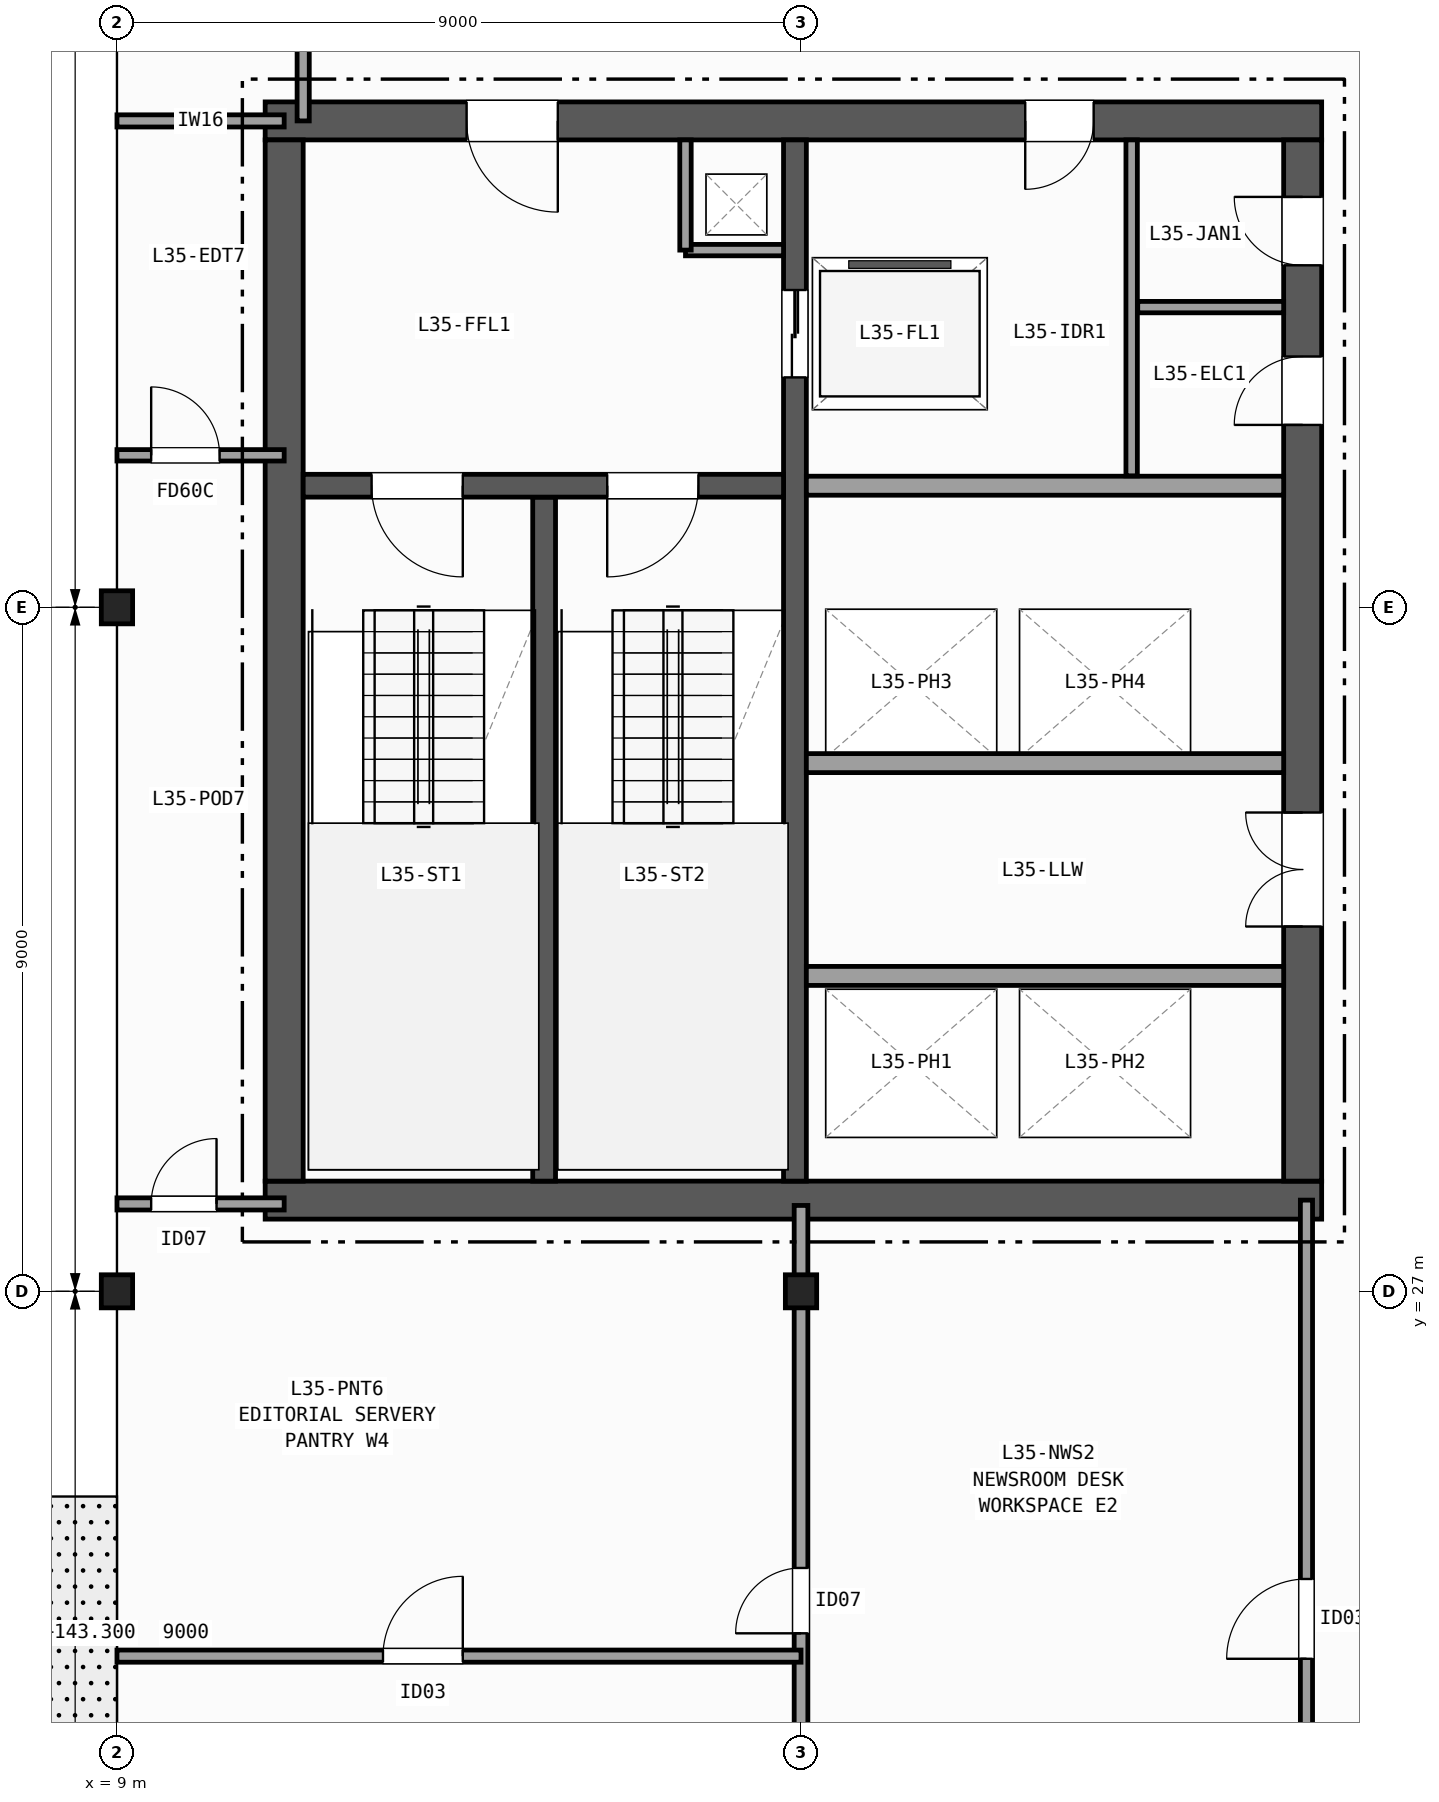
"""IFC4 building model, lengths in metres.
Left out: names, types, materials, properties, quantities, classifications, styles, units other than length and angle.
Written with IfcOpenShell. Run it as: python <this file> out.ifc"""

import sys

from ifc_helpers import new_model, si_unit, direction, frame, frame_2d, origin, origin_2d, place, context, subcontext, project, spatial, rectangle, i_section, extrude, element, fill, save


model = new_model("IFC4")
c1 = context("Model", 3, precision=1e-05, world=origin(), true_north=direction((0.0, 1.0)))
c2 = subcontext(c1, "Body", "Model", "MODEL_VIEW")
j1 = project(units=[si_unit("LENGTHUNIT", "METRE"), si_unit("PLANEANGLEUNIT", "RADIAN")], contexts=[c1])
p1 = place(None, origin())
s1 = spatial("IfcSite", under=j1, at=p1, CompositionType="ELEMENT")
p2 = place(p1, origin())
s2 = spatial("IfcBuilding", under=s1, at=p2, CompositionType="ELEMENT")
p3 = place(p2, frame((0.0, 0.0, 143.3)))
s3 = spatial("IfcBuildingStorey", under=s2, at=p3, CompositionType="ELEMENT", Elevation=143.3)
for number, where, z_axis, x_axis in (
    (1, (9.0, 27.0, 0.0), (0.0, 0.0, 1.0), (1.0, 0.0, 0.0)),
    (2, (9.0, 36.0, 0.0), (0.0, 0.0, 1.0), (1.0, 0.0, 0.0)),
    (3, (18.0, 27.0, 0.0), (0.0, 0.0, 1.0), (1.0, 0.0, 0.0)),
):
    element("IfcColumn", number, at=place(p3, frame(where, z_axis=z_axis, x_axis=x_axis)), inside=s3, PredefinedType="COLUMN", context=c2, shape_type="SweptSolid", body=[
        extrude(i_section(OverallWidth=0.412, OverallDepth=0.435, WebThickness=0.036, FlangeThickness=0.057, FilletRadius=0.015, at=origin_2d()), origin(), (0.0, 0.0, 1.0), 3.7),
    ])
p4 = place(p3, frame((10.95, 28.2, 0.0), z_axis=(0.0, 0.0, 1.0), x_axis=(1.0, 0.0, 0.0)))
e4 = element("IfcWall", 4, at=p4, inside=s3, PredefinedType="SHEAR", context=c2, shape_type="SweptSolid", body=[
    extrude(rectangle(XDim=13.9, YDim=0.5, at=frame_2d((6.95, 0.0))), origin(), (0.0, 0.0, 1.0), 3.42),
])
p5 = place(p3, frame((24.85, 42.4, 0.0), z_axis=(0.0, 0.0, 1.0), x_axis=(-1.0, 0.0, 0.0)))
e5 = element("IfcWall", 5, at=p5, inside=s3, PredefinedType="SHEAR", context=c2, shape_type="SweptSolid", body=[
    extrude(rectangle(XDim=13.9, YDim=0.5, at=frame_2d((6.95, 0.0))), origin(), (0.0, 0.0, 1.0), 3.42),
])
p6 = place(p5, frame((10.05, 0.0, 0.0)))
e6 = element("IfcOpeningElement", 6, at=p6, cuts=e5, PredefinedType="OPENING", context=c2, shape_type="SweptSolid", body=[
    extrude(rectangle(XDim=1.2, YDim=2.15, at=frame_2d((0.6, 1.075))), frame((0.0, 0.26, 0.0), z_axis=(0.0, -1.0, 0.0), x_axis=(1.0, 0.0, 0.0)), (0.0, 0.0, 1.0), 0.52),
])
p7 = place(p5, frame((3.0, 0.0, 0.0)))
e7 = element("IfcOpeningElement", 7, at=p7, cuts=e5, PredefinedType="OPENING", context=c2, shape_type="SweptSolid", body=[
    extrude(rectangle(XDim=0.9, YDim=2.1, at=frame_2d((0.45, 1.05))), frame((0.0, 0.26, 0.0), z_axis=(0.0, -1.0, 0.0), x_axis=(1.0, 0.0, 0.0)), (0.0, 0.0, 1.0), 0.52),
])
p8 = place(p3, frame((11.2, 42.15, 0.0), z_axis=(0.0, 0.0, 1.0), x_axis=(0.0, -1.0, 0.0)))
e8 = element("IfcWall", 8, at=p8, inside=s3, PredefinedType="SHEAR", context=c2, shape_type="SweptSolid", body=[
    extrude(rectangle(XDim=13.7, YDim=0.5, at=frame_2d((6.85, 0.0))), origin(), (0.0, 0.0, 1.0), 3.42),
])
p9 = place(p3, frame((24.6, 28.45, 0.0), z_axis=(0.0, 0.0, 1.0), x_axis=(0.0, 1.0, 0.0)))
e9 = element("IfcWall", 9, at=p9, inside=s3, PredefinedType="SHEAR", context=c2, shape_type="SweptSolid", body=[
    extrude(rectangle(XDim=13.7, YDim=0.5, at=frame_2d((6.85, 0.0))), origin(), (0.0, 0.0, 1.0), 3.42),
])
p10 = place(p9, frame((3.35, 0.0, 0.0)))
e10 = element("IfcOpeningElement", 10, at=p10, cuts=e9, PredefinedType="OPENING", context=c2, shape_type="SweptSolid", body=[
    extrude(rectangle(XDim=1.5, YDim=2.2, at=frame_2d((0.75, 1.1))), frame((0.0, 0.26, 0.0), z_axis=(0.0, -1.0, 0.0), x_axis=(1.0, 0.0, 0.0)), (0.0, 0.0, 1.0), 0.52),
])
p11 = place(p9, frame((9.95, 0.0, 0.0)))
e11 = element("IfcOpeningElement", 11, at=p11, cuts=e9, PredefinedType="OPENING", context=c2, shape_type="SweptSolid", body=[
    extrude(rectangle(XDim=0.9, YDim=2.1, at=frame_2d((0.45, 1.05))), frame((0.0, 0.26, 0.0), z_axis=(0.0, -1.0, 0.0), x_axis=(1.0, 0.0, 0.0)), (0.0, 0.0, 1.0), 0.52),
])
p12 = place(p9, frame((12.05, 0.0, 0.0)))
e12 = element("IfcOpeningElement", 12, at=p12, cuts=e9, PredefinedType="OPENING", context=c2, shape_type="SweptSolid", body=[
    extrude(rectangle(XDim=0.9, YDim=2.1, at=frame_2d((0.45, 1.05))), frame((0.0, 0.26, 0.0), z_axis=(0.0, -1.0, 0.0), x_axis=(1.0, 0.0, 0.0)), (0.0, 0.0, 1.0), 0.52),
])
p13 = place(p3, frame((14.62, 28.45, 0.0), z_axis=(0.0, 0.0, 1.0), x_axis=(0.0, 1.0, 0.0)))
e13 = element("IfcWall", 13, at=p13, inside=s3, PredefinedType="SHEAR", context=c2, shape_type="SweptSolid", body=[
    extrude(rectangle(XDim=9.0, YDim=0.3, at=frame_2d((4.5, 0.0))), origin(), (0.0, 0.0, 1.0), 3.42),
])
p14 = place(p3, frame((17.92, 42.15, 0.0), z_axis=(0.0, 0.0, 1.0), x_axis=(0.0, -1.0, 0.0)))
e14 = element("IfcWall", 14, at=p14, inside=s3, PredefinedType="SHEAR", context=c2, shape_type="SweptSolid", body=[
    extrude(rectangle(XDim=13.7, YDim=0.3, at=frame_2d((6.85, 0.0))), origin(), (0.0, 0.0, 1.0), 3.42),
])
p15 = place(p14, frame((1.975, 0.0, 0.0)))
e15 = element("IfcOpeningElement", 15, at=p15, cuts=e14, PredefinedType="OPENING", context=c2, shape_type="SweptSolid", body=[
    extrude(rectangle(XDim=1.15, YDim=2.15, at=frame_2d((0.575, 1.075))), frame((0.0, 0.16, 0.0), z_axis=(0.0, -1.0, 0.0), x_axis=(1.0, 0.0, 0.0)), (0.0, 0.0, 1.0), 0.32),
])
p16 = place(p3, frame((17.77, 37.6, 0.0), z_axis=(0.0, 0.0, 1.0), x_axis=(-1.0, 0.0, 0.0)))
e16 = element("IfcWall", 16, at=p16, inside=s3, PredefinedType="SHEAR", context=c2, shape_type="SweptSolid", body=[
    extrude(rectangle(XDim=6.32, YDim=0.3, at=frame_2d((3.16, 0.0))), origin(), (0.0, 0.0, 1.0), 3.42),
])
p17 = place(p16, frame((4.22, 0.0, 0.0)))
e17 = element("IfcOpeningElement", 17, at=p17, cuts=e16, PredefinedType="OPENING", context=c2, shape_type="SweptSolid", body=[
    extrude(rectangle(XDim=1.2, YDim=2.15, at=frame_2d((0.6, 1.075))), frame((0.0, 0.16, 0.0), z_axis=(0.0, -1.0, 0.0), x_axis=(1.0, 0.0, 0.0)), (0.0, 0.0, 1.0), 0.32),
])
p18 = place(p16, frame((1.12, 0.0, 0.0)))
e18 = element("IfcOpeningElement", 18, at=p18, cuts=e16, PredefinedType="OPENING", context=c2, shape_type="SweptSolid", body=[
    extrude(rectangle(XDim=1.2, YDim=2.15, at=frame_2d((0.6, 1.075))), frame((0.0, 0.16, 0.0), z_axis=(0.0, -1.0, 0.0), x_axis=(1.0, 0.0, 0.0)), (0.0, 0.0, 1.0), 0.32),
])
p19 = place(p3, frame((16.48, 40.7, 0.0), z_axis=(0.0, 0.0, 1.0), x_axis=(1.0, 0.0, 0.0)))
e19 = element("IfcWall", 19, at=p19, inside=s3, PredefinedType="PARTITIONING", context=c2, shape_type="SweptSolid", body=[
    extrude(rectangle(XDim=1.29, YDim=0.15, at=frame_2d((0.645, 0.0))), origin(), (0.0, 0.0, 1.0), 3.42),
])
p20 = place(p3, frame((16.48, 40.7, 0.0), z_axis=(0.0, 0.0, 1.0), x_axis=(0.0, 1.0, 0.0)))
e20 = element("IfcWall", 20, at=p20, inside=s3, PredefinedType="PARTITIONING", context=c2, shape_type="SweptSolid", body=[
    extrude(rectangle(XDim=1.45, YDim=0.15, at=frame_2d((0.725, 0.0))), origin(), (0.0, 0.0, 1.0), 3.42),
])
for number, where, z_axis, x_axis in (
    (21, (18.07, 37.6, 0.0), (0.0, 0.0, 1.0), (1.0, 0.0, 0.0)),
    (22, (18.07, 31.15, 0.0), (0.0, 0.0, 1.0), (1.0, 0.0, 0.0)),
    (23, (24.35, 33.95, 0.0), (0.0, 0.0, 1.0), (-1.0, 0.0, 0.0)),
):
    element("IfcWall", number, at=place(p3, frame(where, z_axis=z_axis, x_axis=x_axis)), inside=s3, PredefinedType="PARTITIONING", context=c2, shape_type="SweptSolid", body=[
        extrude(rectangle(XDim=6.28, YDim=0.25, at=frame_2d((3.14, 0.0))), origin(), (0.0, 0.0, 1.0), 3.42),
    ])
p21 = place(p3, frame((22.35, 37.73, 0.0), z_axis=(0.0, 0.0, 1.0), x_axis=(0.0, 1.0, 0.0)))
e24 = element("IfcWall", 24, at=p21, inside=s3, PredefinedType="PARTITIONING", context=c2, shape_type="SweptSolid", body=[
    extrude(rectangle(XDim=4.42, YDim=0.15, at=frame_2d((2.21, 0.0))), origin(), (0.0, 0.0, 1.0), 3.42),
])
p22 = place(p3, frame((22.43, 39.95, 0.0), z_axis=(0.0, 0.0, 1.0), x_axis=(1.0, 0.0, 0.0)))
e25 = element("IfcWall", 25, at=p22, inside=s3, PredefinedType="PARTITIONING", context=c2, shape_type="SweptSolid", body=[
    extrude(rectangle(XDim=1.92, YDim=0.15, at=frame_2d((0.96, 0.0))), origin(), (0.0, 0.0, 1.0), 3.42),
])
p23 = place(p3, frame((9.0, 28.15, 0.0), z_axis=(0.0, 0.0, 1.0), x_axis=(1.0, 0.0, 0.0)))
e26 = element("IfcWall", 26, at=p23, inside=s3, PredefinedType="PARTITIONING", context=c2, shape_type="SweptSolid", body=[
    extrude(rectangle(XDim=2.2, YDim=0.16, at=frame_2d((1.1, 0.0))), origin(), (0.0, 0.0, 1.0), 2.634),
])
p24 = place(p23, frame((0.45, 0.0, 0.0)))
e27 = element("IfcOpeningElement", 27, at=p24, cuts=e26, PredefinedType="OPENING", context=c2, shape_type="SweptSolid", body=[
    extrude(rectangle(XDim=0.86, YDim=2.05, at=frame_2d((0.43, 1.025))), frame((0.0, 0.09, 0.0), z_axis=(0.0, -1.0, 0.0), x_axis=(1.0, 0.0, 0.0)), (0.0, 0.0, 1.0), 0.18),
])
p25 = place(p3, frame((9.0, 42.4, 0.0), z_axis=(0.0, 0.0, 1.0), x_axis=(1.0, 0.0, 0.0)))
e28 = element("IfcWall", 28, at=p25, inside=s3, PredefinedType="PARTITIONING", context=c2, shape_type="SweptSolid", body=[
    extrude(rectangle(XDim=2.2, YDim=0.16, at=frame_2d((1.1, 0.0))), origin(), (0.0, 0.0, 1.0), 2.634),
])
p26 = place(p3, frame((11.45, 42.4, 0.0), z_axis=(0.0, 0.0, 1.0), x_axis=(0.0, 1.0, 0.0)))
e29 = element("IfcWall", 29, at=p26, inside=s3, PredefinedType="PARTITIONING", context=c2, shape_type="SweptSolid", body=[
    extrude(rectangle(XDim=2.1, YDim=0.16, at=frame_2d((1.05, 0.0))), origin(), (0.0, 0.0, 1.0), 3.42),
])
p27 = place(p3, frame((9.0, 38.0, 0.0), z_axis=(0.0, 0.0, 1.0), x_axis=(1.0, 0.0, 0.0)))
e30 = element("IfcWall", 30, at=p27, inside=s3, PredefinedType="PARTITIONING", context=c2, shape_type="SweptSolid", body=[
    extrude(rectangle(XDim=2.2, YDim=0.15, at=frame_2d((1.1, 0.0))), origin(), (0.0, 0.0, 1.0), 2.634),
])
p28 = place(p27, frame((0.45, 0.0, 0.0)))
e31 = element("IfcOpeningElement", 31, at=p28, cuts=e30, PredefinedType="OPENING", context=c2, shape_type="SweptSolid", body=[
    extrude(rectangle(XDim=0.9, YDim=2.1, at=frame_2d((0.45, 1.05))), frame((0.0, 0.085, 0.0), z_axis=(0.0, -1.0, 0.0), x_axis=(1.0, 0.0, 0.0)), (0.0, 0.0, 1.0), 0.17),
])
p29 = place(p3, frame((24.65, 9.0, 0.0), z_axis=(0.0, 0.0, 1.0), x_axis=(0.0, 1.0, 0.0)))
e32 = element("IfcWall", 32, at=p29, inside=s3, PredefinedType="PARTITIONING", context=c2, shape_type="SweptSolid", body=[
    extrude(rectangle(XDim=19.2, YDim=0.16, at=frame_2d((9.6, 0.0))), origin(), (0.0, 0.0, 1.0), 2.634),
])
p30 = place(p29, frame((3.6, 0.0, 0.0)))
e33 = element("IfcOpeningElement", 33, at=p30, cuts=e32, PredefinedType="OPENING", context=c2, shape_type="SweptSolid", body=[
    extrude(rectangle(XDim=1.0, YDim=2.1, at=frame_2d((0.5, 1.05))), frame((0.0, 0.09, 0.0), z_axis=(0.0, -1.0, 0.0), x_axis=(1.0, 0.0, 0.0)), (0.0, 0.0, 1.0), 0.18),
])
p31 = place(p29, frame((13.165, 0.0, 0.0)))
e34 = element("IfcOpeningElement", 34, at=p31, cuts=e32, PredefinedType="OPENING", context=c2, shape_type="SweptSolid", body=[
    extrude(rectangle(XDim=1.05, YDim=2.15, at=frame_2d((0.525, 1.075))), frame((0.0, 0.09, 0.0), z_axis=(0.0, -1.0, 0.0), x_axis=(1.0, 0.0, 0.0)), (0.0, 0.0, 1.0), 0.18),
])
p32 = place(p3, frame((18.0, 9.0, 0.0), z_axis=(0.0, 0.0, 1.0), x_axis=(0.0, 1.0, 0.0)))
e35 = element("IfcWall", 35, at=p32, inside=s3, PredefinedType="PARTITIONING", context=c2, shape_type="SweptSolid", body=[
    extrude(rectangle(XDim=19.13, YDim=0.18, at=frame_2d((9.565, 0.0))), origin(), (0.0, 0.0, 1.0), 2.634),
])
p33 = place(p32, frame((2.2, 0.0, 0.0)))
e36 = element("IfcOpeningElement", 36, at=p33, cuts=e35, PredefinedType="OPENING", context=c2, shape_type="SweptSolid", body=[
    extrude(rectangle(XDim=1.2, YDim=2.15, at=frame_2d((0.6, 1.075))), frame((0.0, 0.1, 0.0), z_axis=(0.0, -1.0, 0.0), x_axis=(1.0, 0.0, 0.0)), (0.0, 0.0, 1.0), 0.2),
])
p34 = place(p32, frame((13.5, 0.0, 0.0)))
e37 = element("IfcOpeningElement", 37, at=p34, cuts=e35, PredefinedType="OPENING", context=c2, shape_type="SweptSolid", body=[
    extrude(rectangle(XDim=0.86, YDim=2.05, at=frame_2d((0.43, 1.025))), frame((0.0, 0.1, 0.0), z_axis=(0.0, -1.0, 0.0), x_axis=(1.0, 0.0, 0.0)), (0.0, 0.0, 1.0), 0.2),
])
p35 = place(p3, frame((9.0, 22.2, 0.0), z_axis=(0.0, 0.0, 1.0), x_axis=(1.0, 0.0, 0.0)))
e38 = element("IfcWall", 38, at=p35, inside=s3, PredefinedType="PARTITIONING", context=c2, shape_type="SweptSolid", body=[
    extrude(rectangle(XDim=9.0, YDim=0.16, at=frame_2d((4.5, 0.0))), origin(), (0.0, 0.0, 1.0), 2.634),
])
p36 = place(p35, frame((3.5, 0.0, 0.0)))
e39 = element("IfcOpeningElement", 39, at=p36, cuts=e38, PredefinedType="OPENING", context=c2, shape_type="SweptSolid", body=[
    extrude(rectangle(XDim=1.05, YDim=2.15, at=frame_2d((0.525, 1.075))), frame((0.0, 0.09, 0.0), z_axis=(0.0, -1.0, 0.0), x_axis=(1.0, 0.0, 0.0)), (0.0, 0.0, 1.0), 0.18),
])
p37 = place(p17, origin())
e40 = element("IfcDoor", 40, at=p37, inside=s3, OperationType="SINGLE_SWING_LEFT", PredefinedType="DOOR", context=c2, shape_type="SweptSolid", body=[
    extrude(rectangle(XDim=1.2, YDim=2.15, at=frame_2d((0.6, 1.075))), frame((0.0, 0.025, 0.0), z_axis=(0.0, -1.0, 0.0), x_axis=(1.0, 0.0, 0.0)), (0.0, 0.0, 1.0), 0.05),
])
fill(e17, e40)
p38 = place(p18, origin())
e41 = element("IfcDoor", 41, at=p38, inside=s3, OperationType="SINGLE_SWING_RIGHT", PredefinedType="DOOR", context=c2, shape_type="SweptSolid", body=[
    extrude(rectangle(XDim=1.2, YDim=2.15, at=frame_2d((0.6, 1.075))), frame((0.0, 0.025, 0.0), z_axis=(0.0, -1.0, 0.0), x_axis=(1.0, 0.0, 0.0)), (0.0, 0.0, 1.0), 0.05),
])
fill(e18, e41)
p39 = place(p10, origin())
e42 = element("IfcDoor", 42, at=p39, inside=s3, OperationType="DOUBLE_DOOR_SINGLE_SWING", PredefinedType="DOOR", context=c2, shape_type="SweptSolid", body=[
    extrude(rectangle(XDim=1.5, YDim=2.2, at=frame_2d((0.75, 1.1))), frame((0.0, 0.025, 0.0), z_axis=(0.0, -1.0, 0.0), x_axis=(1.0, 0.0, 0.0)), (0.0, 0.0, 1.0), 0.05),
])
fill(e10, e42)
p40 = place(p6, origin())
e43 = element("IfcDoor", 43, at=p40, inside=s3, OperationType="SINGLE_SWING_LEFT", PredefinedType="DOOR", context=c2, shape_type="SweptSolid", body=[
    extrude(rectangle(XDim=1.2, YDim=2.15, at=frame_2d((0.6, 1.075))), frame((0.0, 0.025, 0.0), z_axis=(0.0, -1.0, 0.0), x_axis=(1.0, 0.0, 0.0)), (0.0, 0.0, 1.0), 0.05),
])
fill(e6, e43)
p41 = place(p11, origin())
e44 = element("IfcDoor", 44, at=p41, inside=s3, OperationType="SINGLE_SWING_LEFT", PredefinedType="DOOR", context=c2, shape_type="SweptSolid", body=[
    extrude(rectangle(XDim=0.9, YDim=2.1, at=frame_2d((0.45, 1.05))), frame((0.0, 0.025, 0.0), z_axis=(0.0, -1.0, 0.0), x_axis=(1.0, 0.0, 0.0)), (0.0, 0.0, 1.0), 0.05),
])
fill(e11, e44)
p42 = place(p7, origin())
e45 = element("IfcDoor", 45, at=p42, inside=s3, OperationType="SINGLE_SWING_RIGHT", PredefinedType="DOOR", context=c2, shape_type="SweptSolid", body=[
    extrude(rectangle(XDim=0.9, YDim=2.1, at=frame_2d((0.45, 1.05))), frame((0.0, 0.025, 0.0), z_axis=(0.0, -1.0, 0.0), x_axis=(1.0, 0.0, 0.0)), (0.0, 0.0, 1.0), 0.05),
])
fill(e7, e45)
p43 = place(p12, origin())
e46 = element("IfcDoor", 46, at=p43, inside=s3, OperationType="SINGLE_SWING_RIGHT", PredefinedType="DOOR", context=c2, shape_type="SweptSolid", body=[
    extrude(rectangle(XDim=0.9, YDim=2.1, at=frame_2d((0.45, 1.05))), frame((0.0, 0.025, 0.0), z_axis=(0.0, -1.0, 0.0), x_axis=(1.0, 0.0, 0.0)), (0.0, 0.0, 1.0), 0.05),
])
fill(e12, e46)
p44 = place(p15, origin())
e47 = element("IfcDoor", 47, at=p44, inside=s3, OperationType="DOUBLE_DOOR_SLIDING", PredefinedType="DOOR", context=c2, shape_type="SweptSolid", body=[
    extrude(rectangle(XDim=1.15, YDim=2.15, at=frame_2d((0.575, 1.075))), frame((0.0, 0.025, 0.0), z_axis=(0.0, -1.0, 0.0), x_axis=(1.0, 0.0, 0.0)), (0.0, 0.0, 1.0), 0.05),
])
fill(e15, e47)
p45 = place(p24, origin())
e48 = element("IfcDoor", 48, at=p45, inside=s3, OperationType="SINGLE_SWING_RIGHT", PredefinedType="DOOR", context=c2, shape_type="SweptSolid", body=[
    extrude(rectangle(XDim=0.86, YDim=2.05, at=frame_2d((0.43, 1.025))), frame((0.0, 0.025, 0.0), z_axis=(0.0, -1.0, 0.0), x_axis=(1.0, 0.0, 0.0)), (0.0, 0.0, 1.0), 0.05),
])
fill(e27, e48)
p46 = place(p28, origin())
e49 = element("IfcDoor", 49, at=p46, inside=s3, OperationType="SINGLE_SWING_LEFT", PredefinedType="DOOR", context=c2, shape_type="SweptSolid", body=[
    extrude(rectangle(XDim=0.9, YDim=2.1, at=frame_2d((0.45, 1.05))), frame((0.0, 0.025, 0.0), z_axis=(0.0, -1.0, 0.0), x_axis=(1.0, 0.0, 0.0)), (0.0, 0.0, 1.0), 0.05),
])
fill(e31, e49)
p47 = place(p31, origin())
e50 = element("IfcDoor", 50, at=p47, inside=s3, OperationType="SINGLE_SWING_LEFT", PredefinedType="DOOR", context=c2, shape_type="SweptSolid", body=[
    extrude(rectangle(XDim=1.05, YDim=2.15, at=frame_2d((0.525, 1.075))), frame((0.0, 0.025, 0.0), z_axis=(0.0, -1.0, 0.0), x_axis=(1.0, 0.0, 0.0)), (0.0, 0.0, 1.0), 0.05),
])
fill(e34, e50)
p48 = place(p34, origin())
e51 = element("IfcDoor", 51, at=p48, inside=s3, OperationType="SINGLE_SWING_LEFT", PredefinedType="DOOR", context=c2, shape_type="SweptSolid", body=[
    extrude(rectangle(XDim=0.86, YDim=2.05, at=frame_2d((0.43, 1.025))), frame((0.0, 0.025, 0.0), z_axis=(0.0, -1.0, 0.0), x_axis=(1.0, 0.0, 0.0)), (0.0, 0.0, 1.0), 0.05),
])
fill(e37, e51)
p49 = place(p36, origin())
e52 = element("IfcDoor", 52, at=p49, inside=s3, OperationType="SINGLE_SWING_RIGHT", PredefinedType="DOOR", context=c2, shape_type="SweptSolid", body=[
    extrude(rectangle(XDim=1.05, YDim=2.15, at=frame_2d((0.525, 1.075))), frame((0.0, 0.025, 0.0), z_axis=(0.0, -1.0, 0.0), x_axis=(1.0, 0.0, 0.0)), (0.0, 0.0, 1.0), 0.05),
])
fill(e39, e52)
save(model, sys.argv[1])
